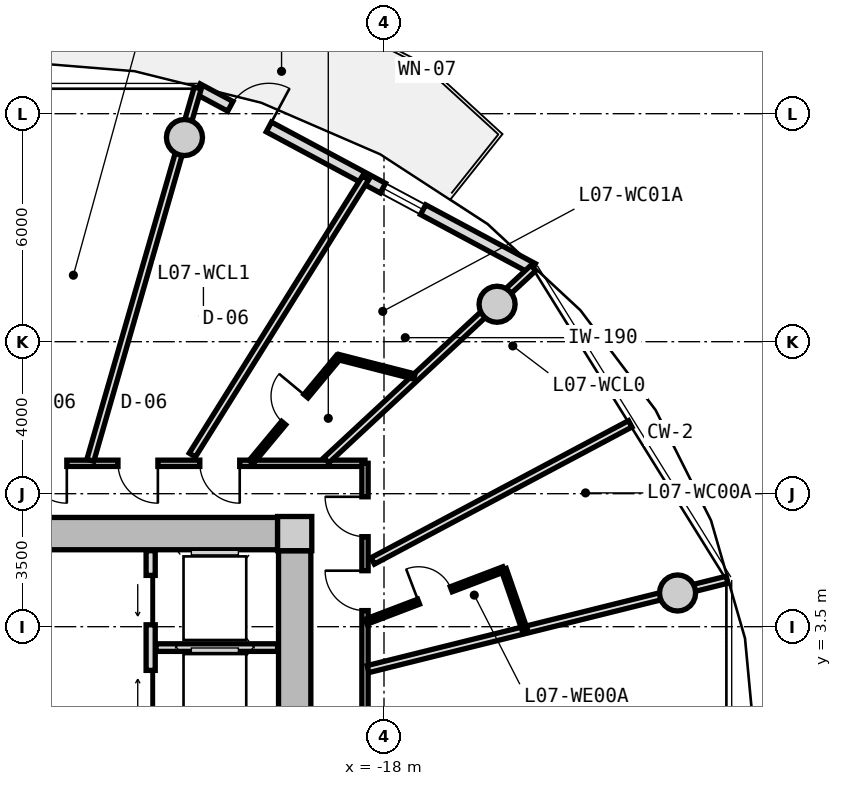
"""IFC4 building model, lengths in metres.
Left out: names, types, materials, properties, quantities, classifications, styles, units other than length and angle.
Written with IfcOpenShell. Run it as: python <this file> out.ifc"""

import sys

from ifc_helpers import new_model, si_unit, direction, frame, frame_2d, origin, origin_2d, place, context, subcontext, project, spatial, rectangle, circle, extrude, source, transform, mapped, element, fill, save


model = new_model("IFC4")
c1 = context("Model", 3, precision=1e-05, world=origin(), true_north=direction((0.0, 1.0)))
c2 = subcontext(c1, "Body", "Model", "MODEL_VIEW")
j1 = project(units=[si_unit("LENGTHUNIT", "METRE"), si_unit("PLANEANGLEUNIT", "RADIAN")], contexts=[c1])
p1 = place(None, origin())
s1 = spatial("IfcSite", under=j1, at=p1, CompositionType="ELEMENT")
p2 = place(p1, origin())
s2 = spatial("IfcBuilding", under=s1, at=p2, CompositionType="ELEMENT")
p3 = place(p2, frame((0.0, 0.0, 27.7)))
s3 = spatial("IfcBuildingStorey", under=s2, at=p3, CompositionType="ELEMENT", Elevation=27.7)
m1 = source(origin(), c2, "Body", "SweptSolid", [
    extrude(rectangle(XDim=0.9, YDim=0.9, at=origin_2d()), origin(), (0.0, 0.0, 1.0), 3.05),
])
p4 = place(p3, frame((-20.35, 5.95, 0.0), z_axis=(0.0, 0.0, 1.0), x_axis=(1.0, 0.0, 0.0)))
e1 = element("IfcColumn", 1, at=p4, inside=s3, PredefinedType="COLUMN", context=c2, shape_type="MappedRepresentation", body=[
    mapped(m1, transform((0.0, 0.0, 0.0), x_axis=(1.0, 0.0, 0.0), y_axis=(0.0, 1.0, 0.0), z_axis=(0.0, 0.0, 1.0), scale=1.0)),
])
m2 = source(origin(), c2, "Body", "SweptSolid", [
    extrude(rectangle(XDim=14.4, YDim=0.85, at=frame_2d((7.2, 0.0))), origin(), (0.0, 0.0, 1.0), 2.79),
])
p5 = place(p3, frame((-35.2, 5.95, 0.0), z_axis=(0.0, 0.0, 1.0), x_axis=(1.0, 0.0, 0.0)))
e2 = element("IfcWall", 2, at=p5, inside=s3, PredefinedType="SHEAR", context=c2, shape_type="MappedRepresentation", body=[
    mapped(m2, transform((0.0, 0.0, 0.0), x_axis=(1.0, 0.0, 0.0), y_axis=(0.0, 1.0, 0.0), z_axis=(0.0, 0.0, 1.0), scale=1.0)),
])
m3 = source(origin(), c2, "Body", "SweptSolid", [
    extrude(rectangle(XDim=11.0, YDim=0.85, at=frame_2d((5.5, 0.0))), origin(), (0.0, 0.0, 1.0), 2.79),
])
p6 = place(p3, frame((-20.35, 5.5, 0.0), z_axis=(0.0, 0.0, 1.0), x_axis=(0.0, -1.0, 0.0)))
e3 = element("IfcWall", 3, at=p6, inside=s3, PredefinedType="SHEAR", context=c2, shape_type="MappedRepresentation", body=[
    mapped(m3, transform((0.0, 0.0, 0.0), x_axis=(1.0, 0.0, 0.0), y_axis=(0.0, 1.0, 0.0), z_axis=(0.0, 0.0, 1.0), scale=1.0)),
])
p7 = place(p6, frame((5.65, 0.0, 0.0)))
e4 = element("IfcOpeningElement", 4, at=p7, cuts=e3, PredefinedType="OPENING", context=c2, shape_type="SweptSolid", body=[
    extrude(rectangle(XDim=1.2, YDim=2.15, at=frame_2d((0.6, 1.075))), frame((0.0, 0.435, 0.0), z_axis=(0.0, -1.0, 0.0), x_axis=(1.0, 0.0, 0.0)), (0.0, 0.0, 1.0), 0.87),
])
m4 = source(origin(), c2, "Body", "SweptSolid", [
    extrude(circle(Radius=0.475, at=origin_2d()), origin(), (0.0, 0.0, 1.0), 3.05),
])
for number, where, z_axis, x_axis in (
    (5, (-10.275, 4.387, 0.0), (0.0, 0.0, 1.0), (1.0, 0.0, 0.0)),
    (6, (-15.025, 11.985, 0.0), (0.0, 0.0, 1.0), (1.0, 0.0, 0.0)),
    (7, (-23.251, 16.373, 0.0), (0.0, 0.0, 1.0), (1.0, 0.0, 0.0)),
):
    element("IfcColumn", number, at=place(p3, frame(where, z_axis=z_axis, x_axis=x_axis)), inside=s3, PredefinedType="COLUMN", context=c2, shape_type="MappedRepresentation", body=[
        mapped(m4, transform((0.0, 0.0, 0.0), x_axis=(1.0, 0.0, 0.0), y_axis=(0.0, 1.0, 0.0), z_axis=(0.0, 0.0, 1.0), scale=1.0)),
    ])
m5 = source(origin(), c2, "Body", "SweptSolid", [
    extrude(rectangle(XDim=10.011, YDim=0.29, at=frame_2d((5.005, 0.0))), origin(), (0.0, 0.0, 1.0), 2.79),
])
p8 = place(p3, frame((-22.906, 17.657, 0.0), z_axis=(0.0, 0.0, 1.0), x_axis=(0.881272505317, -0.472608475773, 0.0)))
e8 = element("IfcWall", 8, at=p8, inside=s3, PredefinedType="SOLIDWALL", context=c2, shape_type="MappedRepresentation", body=[
    mapped(m5, transform((0.0, 0.0, 0.0), x_axis=(1.0, 0.0, 0.0), y_axis=(0.0, 1.0, 0.0), z_axis=(0.0, 0.0, 1.0), scale=1.0)),
])
p9 = place(p8, frame((0.98, 0.0, 0.0)))
e9 = element("IfcOpeningElement", 9, at=p9, cuts=e8, PredefinedType="OPENING", context=c2, shape_type="SweptSolid", body=[
    extrude(rectangle(XDim=1.15, YDim=2.25, at=frame_2d((0.575, 1.125))), frame((0.0, 0.155, 0.0), z_axis=(0.0, -1.0, 0.0), x_axis=(1.0, 0.0, 0.0)), (0.0, 0.0, 1.0), 0.31),
])
p10 = place(p8, frame((5.535, 0.0, 0.85)))
e10 = element("IfcOpeningElement", 10, at=p10, cuts=e8, PredefinedType="OPENING", context=c2, shape_type="SweptSolid", body=[
    extrude(rectangle(XDim=1.2, YDim=1.5, at=frame_2d((0.6, 0.75))), frame((0.0, 0.155, 0.0), z_axis=(0.0, -1.0, 0.0), x_axis=(1.0, 0.0, 0.0)), (0.0, 0.0, 1.0), 0.31),
])
m6 = source(origin(), c2, "Body", "SweptSolid", [
    extrude(rectangle(XDim=5.0, YDim=0.24, at=frame_2d((2.5, 0.0))), origin(), (0.0, 0.0, 1.0), 2.775),
])
p11 = place(p3, frame((-24.14, 0.5, 0.0), z_axis=(0.0, 0.0, 1.0), x_axis=(0.0, 1.0, 0.0)))
e11 = element("IfcWall", 11, at=p11, inside=s3, PredefinedType="PARTITIONING", context=c2, shape_type="MappedRepresentation", body=[
    mapped(m6, transform((0.0, 0.0, 0.0), x_axis=(1.0, 0.0, 0.0), y_axis=(0.0, 1.0, 0.0), z_axis=(0.0, 0.0, 1.0), scale=1.0)),
])
p12 = place(p11, frame((3.05, 0.0, 0.0)))
e12 = element("IfcOpeningElement", 12, at=p12, cuts=e11, PredefinedType="OPENING", context=c2, shape_type="SweptSolid", body=[
    extrude(rectangle(XDim=1.3, YDim=2.2, at=frame_2d((0.65, 1.1))), frame((0.0, 0.13, 0.0), z_axis=(0.0, -1.0, 0.0), x_axis=(1.0, 0.0, 0.0)), (0.0, 0.0, 1.0), 0.26),
])
p13 = place(p11, frame((0.55, 0.0, 0.0)))
e13 = element("IfcOpeningElement", 13, at=p13, cuts=e11, PredefinedType="OPENING", context=c2, shape_type="SweptSolid", body=[
    extrude(rectangle(XDim=1.3, YDim=2.2, at=frame_2d((0.65, 1.1))), frame((0.0, 0.13, 0.0), z_axis=(0.0, -1.0, 0.0), x_axis=(1.0, 0.0, 0.0)), (0.0, 0.0, 1.0), 0.26),
])
m7 = source(origin(), c2, "Body", "SweptSolid", [
    extrude(rectangle(XDim=3.2, YDim=0.2, at=frame_2d((1.6, 0.0))), origin(), (0.0, 0.0, 1.0), 2.775),
])
p14 = place(p3, frame((-24.0, 2.95, 0.0), z_axis=(0.0, 0.0, 1.0), x_axis=(1.0, 0.0, 0.0)))
e14 = element("IfcWall", 14, at=p14, inside=s3, PredefinedType="PARTITIONING", context=c2, shape_type="MappedRepresentation", body=[
    mapped(m7, transform((0.0, 0.0, 0.0), x_axis=(1.0, 0.0, 0.0), y_axis=(0.0, 1.0, 0.0), z_axis=(0.0, 0.0, 1.0), scale=1.0)),
])
m8 = source(origin(), c2, "Body", "SweptSolid", [
    extrude(rectangle(XDim=19.0, YDim=0.165, at=frame_2d((9.5, 0.0))), origin(), (0.0, 0.0, 1.0), 2.775),
])
p15 = place(p3, frame((-37.5, 7.8, 0.0), z_axis=(0.0, 0.0, 1.0), x_axis=(1.0, 0.0, 0.0)))
e15 = element("IfcWall", 15, at=p15, inside=s3, PredefinedType="PARTITIONING", context=c2, shape_type="MappedRepresentation", body=[
    mapped(m8, transform((0.0, 0.0, 0.0), x_axis=(1.0, 0.0, 0.0), y_axis=(0.0, 1.0, 0.0), z_axis=(0.0, 0.0, 1.0), scale=1.0)),
])
p16 = place(p15, frame((14.653, 0.0, 0.0)))
e16 = element("IfcOpeningElement", 16, at=p16, cuts=e15, PredefinedType="OPENING", context=c2, shape_type="SweptSolid", body=[
    extrude(rectangle(XDim=1.05, YDim=2.15, at=frame_2d((0.525, 1.075))), frame((0.0, 0.093, 0.0), z_axis=(0.0, -1.0, 0.0), x_axis=(1.0, 0.0, 0.0)), (0.0, 0.0, 1.0), 0.185),
])
p17 = place(p15, frame((12.5, 0.0, 0.0)))
e17 = element("IfcOpeningElement", 17, at=p17, cuts=e15, PredefinedType="OPENING", context=c2, shape_type="SweptSolid", body=[
    extrude(rectangle(XDim=1.05, YDim=2.15, at=frame_2d((0.525, 1.075))), frame((0.0, 0.093, 0.0), z_axis=(0.0, -1.0, 0.0), x_axis=(1.0, 0.0, 0.0)), (0.0, 0.0, 1.0), 0.185),
])
p18 = place(p15, frame((10.104, 0.0, 0.0)))
e18 = element("IfcOpeningElement", 18, at=p18, cuts=e15, PredefinedType="OPENING", context=c2, shape_type="SweptSolid", body=[
    extrude(rectangle(XDim=1.05, YDim=2.15, at=frame_2d((0.525, 1.075))), frame((0.0, 0.093, 0.0), z_axis=(0.0, -1.0, 0.0), x_axis=(1.0, 0.0, 0.0)), (0.0, 0.0, 1.0), 0.185),
])
p19 = place(p15, frame((7.806, 0.0, 0.0)))
e19 = element("IfcOpeningElement", 19, at=p19, cuts=e15, PredefinedType="OPENING", context=c2, shape_type="SweptSolid", body=[
    extrude(rectangle(XDim=1.05, YDim=2.15, at=frame_2d((0.525, 1.075))), frame((0.0, 0.093, 0.0), z_axis=(0.0, -1.0, 0.0), x_axis=(1.0, 0.0, 0.0)), (0.0, 0.0, 1.0), 0.185),
])
p20 = place(p15, frame((5.915, 0.0, 0.0)))
e20 = element("IfcOpeningElement", 20, at=p20, cuts=e15, PredefinedType="OPENING", context=c2, shape_type="SweptSolid", body=[
    extrude(rectangle(XDim=0.92, YDim=2.1, at=frame_2d((0.46, 1.05))), frame((0.0, 0.093, 0.0), z_axis=(0.0, -1.0, 0.0), x_axis=(1.0, 0.0, 0.0)), (0.0, 0.0, 1.0), 0.185),
])
p21 = place(p15, frame((2.769, 0.0, 0.0)))
e21 = element("IfcOpeningElement", 21, at=p21, cuts=e15, PredefinedType="OPENING", context=c2, shape_type="SweptSolid", body=[
    extrude(rectangle(XDim=0.92, YDim=2.1, at=frame_2d((0.46, 1.05))), frame((0.0, 0.093, 0.0), z_axis=(0.0, -1.0, 0.0), x_axis=(1.0, 0.0, 0.0)), (0.0, 0.0, 1.0), 0.185),
])
m9 = source(origin(), c2, "Body", "SweptSolid", [
    extrude(rectangle(XDim=15.6, YDim=0.165, at=frame_2d((7.8, 0.0))), origin(), (0.0, 0.0, 1.0), 2.775),
])
p22 = place(p3, frame((-18.5, 7.8, 0.0), z_axis=(0.0, 0.0, 1.0), x_axis=(0.0, -1.0, 0.0)))
e22 = element("IfcWall", 22, at=p22, inside=s3, PredefinedType="PARTITIONING", context=c2, shape_type="MappedRepresentation", body=[
    mapped(m9, transform((0.0, 0.0, 0.0), x_axis=(1.0, 0.0, 0.0), y_axis=(0.0, 1.0, 0.0), z_axis=(0.0, 0.0, 1.0), scale=1.0)),
])
p23 = place(p22, frame((12.141, 0.0, 0.0)))
e23 = element("IfcOpeningElement", 23, at=p23, cuts=e22, PredefinedType="OPENING", context=c2, shape_type="SweptSolid", body=[
    extrude(rectangle(XDim=1.25, YDim=2.2, at=frame_2d((0.625, 1.1))), frame((0.0, 0.093, 0.0), z_axis=(0.0, -1.0, 0.0), x_axis=(1.0, 0.0, 0.0)), (0.0, 0.0, 1.0), 0.185),
])
p24 = place(p22, frame((7.175, 0.0, 0.0)))
e24 = element("IfcOpeningElement", 24, at=p24, cuts=e22, PredefinedType="OPENING", context=c2, shape_type="SweptSolid", body=[
    extrude(rectangle(XDim=1.25, YDim=2.2, at=frame_2d((0.625, 1.1))), frame((0.0, 0.093, 0.0), z_axis=(0.0, -1.0, 0.0), x_axis=(1.0, 0.0, 0.0)), (0.0, 0.0, 1.0), 0.185),
])
p25 = place(p22, frame((2.826, 0.0, 0.0)))
e25 = element("IfcOpeningElement", 25, at=p25, cuts=e22, PredefinedType="OPENING", context=c2, shape_type="SweptSolid", body=[
    extrude(rectangle(XDim=1.05, YDim=2.15, at=frame_2d((0.525, 1.075))), frame((0.0, 0.093, 0.0), z_axis=(0.0, -1.0, 0.0), x_axis=(1.0, 0.0, 0.0)), (0.0, 0.0, 1.0), 0.185),
])
p26 = place(p22, frame((0.881, 0.0, 0.0)))
e26 = element("IfcOpeningElement", 26, at=p26, cuts=e22, PredefinedType="OPENING", context=c2, shape_type="SweptSolid", body=[
    extrude(rectangle(XDim=1.05, YDim=2.15, at=frame_2d((0.525, 1.075))), frame((0.0, 0.093, 0.0), z_axis=(0.0, -1.0, 0.0), x_axis=(1.0, 0.0, 0.0)), (0.0, 0.0, 1.0), 0.185),
])
m10 = source(origin(), c2, "Body", "SweptSolid", [
    extrude(rectangle(XDim=7.435, YDim=0.19, at=frame_2d((3.717, 0.0))), origin(), (0.0, 0.0, 1.0), 2.225),
])
p27 = place(p3, frame((-19.517, 7.88, 0.0), z_axis=(0.0, 0.0, 1.0), x_axis=(0.732651956848, 0.680603489652, 0.0)))
e27 = element("IfcWall", 27, at=p27, inside=s3, PredefinedType="PARTITIONING", context=c2, shape_type="MappedRepresentation", body=[
    mapped(m10, transform((0.0, 0.0, 0.0), x_axis=(1.0, 0.0, 0.0), y_axis=(0.0, 1.0, 0.0), z_axis=(0.0, 0.0, 1.0), scale=1.0)),
])
m11 = source(origin(), c2, "Body", "SweptSolid", [
    extrude(rectangle(XDim=10.196, YDim=0.19, at=frame_2d((5.098, 0.0))), origin(), (0.0, 0.0, 1.0), 2.225),
])
p28 = place(p3, frame((-25.727, 7.88, 0.0), z_axis=(0.0, 0.0, 1.0), x_axis=(0.277136420347, 0.960830580549, 0.0)))
e28 = element("IfcWall", 28, at=p28, inside=s3, PredefinedType="PARTITIONING", context=c2, shape_type="MappedRepresentation", body=[
    mapped(m11, transform((0.0, 0.0, 0.0), x_axis=(1.0, 0.0, 0.0), y_axis=(0.0, 1.0, 0.0), z_axis=(0.0, 0.0, 1.0), scale=1.0)),
])
m12 = source(origin(), c2, "Body", "SweptSolid", [
    extrude(rectangle(XDim=8.598, YDim=0.19, at=frame_2d((4.299, 0.0))), origin(), (0.0, 0.0, 1.0), 2.775),
])
p29 = place(p3, frame((-23.043, 8.017, 0.0), z_axis=(0.0, 0.0, 1.0), x_axis=(0.530039776395, 0.847972779893, 0.0)))
e29 = element("IfcWall", 29, at=p29, inside=s3, PredefinedType="PARTITIONING", context=c2, shape_type="MappedRepresentation", body=[
    mapped(m12, transform((0.0, 0.0, 0.0), x_axis=(1.0, 0.0, 0.0), y_axis=(0.0, 1.0, 0.0), z_axis=(0.0, 0.0, 1.0), scale=1.0)),
])
m13 = source(origin(), c2, "Body", "SweptSolid", [
    extrude(rectangle(XDim=3.594, YDim=0.14, at=frame_2d((1.797, 0.0))), origin(), (0.0, 0.0, 1.0), 2.775),
])
p30 = place(p3, frame((-21.496, 7.83, 0.0), z_axis=(0.0, 0.0, 1.0), x_axis=(0.639001147083, 0.769205781326, 0.0)))
e30 = element("IfcWall", 30, at=p30, inside=s3, PredefinedType="PARTITIONING", context=c2, shape_type="MappedRepresentation", body=[
    mapped(m13, transform((0.0, 0.0, 0.0), x_axis=(1.0, 0.0, 0.0), y_axis=(0.0, 1.0, 0.0), z_axis=(0.0, 0.0, 1.0), scale=1.0)),
])
p31 = place(p30, frame((1.337, 0.0, 0.0)))
e31 = element("IfcOpeningElement", 31, at=p31, cuts=e30, PredefinedType="OPENING", context=c2, shape_type="SweptSolid", body=[
    extrude(rectangle(XDim=0.92, YDim=2.1, at=frame_2d((0.46, 1.05))), frame((0.0, 0.08, 0.0), z_axis=(0.0, -1.0, 0.0), x_axis=(1.0, 0.0, 0.0)), (0.0, 0.0, 1.0), 0.16),
])
m14 = source(origin(), c2, "Body", "SweptSolid", [
    extrude(rectangle(XDim=2.062, YDim=0.14, at=frame_2d((1.031, 0.0))), origin(), (0.0, 0.0, 1.0), 2.415),
])
p32 = place(p3, frame((-19.199, 10.595, 0.0), z_axis=(0.0, 0.0, 1.0), x_axis=(0.968776253543, -0.247936626121, 0.0)))
e32 = element("IfcWall", 32, at=p32, inside=s3, PredefinedType="PARTITIONING", context=c2, shape_type="MappedRepresentation", body=[
    mapped(m14, transform((0.0, 0.0, 0.0), x_axis=(1.0, 0.0, 0.0), y_axis=(0.0, 1.0, 0.0), z_axis=(0.0, 0.0, 1.0), scale=1.0)),
])
m15 = source(origin(), c2, "Body", "SweptSolid", [
    extrude(rectangle(XDim=9.737, YDim=0.19, at=frame_2d((4.869, 0.0))), origin(), (0.0, 0.0, 1.0), 2.225),
])
p33 = place(p3, frame((-18.42, 2.385, 0.0), z_axis=(0.0, 0.0, 1.0), x_axis=(0.970392716238, 0.241532557375, 0.0)))
e33 = element("IfcWall", 33, at=p33, inside=s3, PredefinedType="PARTITIONING", context=c2, shape_type="MappedRepresentation", body=[
    mapped(m15, transform((0.0, 0.0, 0.0), x_axis=(1.0, 0.0, 0.0), y_axis=(0.0, 1.0, 0.0), z_axis=(0.0, 0.0, 1.0), scale=1.0)),
])
m16 = source(origin(), c2, "Body", "SweptSolid", [
    extrude(rectangle(XDim=7.677, YDim=0.19, at=frame_2d((3.838, 0.0))), origin(), (0.0, 0.0, 1.0), 2.775),
])
p34 = place(p3, frame((-18.297, 5.231, 0.0), z_axis=(0.0, 0.0, 1.0), x_axis=(0.882725057546, 0.469889851753, 0.0)))
e34 = element("IfcWall", 34, at=p34, inside=s3, PredefinedType="PARTITIONING", context=c2, shape_type="MappedRepresentation", body=[
    mapped(m16, transform((0.0, 0.0, 0.0), x_axis=(1.0, 0.0, 0.0), y_axis=(0.0, 1.0, 0.0), z_axis=(0.0, 0.0, 1.0), scale=1.0)),
])
m17 = source(origin(), c2, "Body", "SweptSolid", [
    extrude(rectangle(XDim=3.874, YDim=0.14, at=frame_2d((1.937, 0.0))), origin(), (0.0, 0.0, 1.0), 2.775),
])
p35 = place(p3, frame((-18.47, 3.632, 0.0), z_axis=(0.0, 0.0, 1.0), x_axis=(0.934461775659, 0.35606346321, 0.0)))
e35 = element("IfcWall", 35, at=p35, inside=s3, PredefinedType="PARTITIONING", context=c2, shape_type="MappedRepresentation", body=[
    mapped(m17, transform((0.0, 0.0, 0.0), x_axis=(1.0, 0.0, 0.0), y_axis=(0.0, 1.0, 0.0), z_axis=(0.0, 0.0, 1.0), scale=1.0)),
])
p36 = place(p35, frame((1.477, 0.0, 0.0)))
e36 = element("IfcOpeningElement", 36, at=p36, cuts=e35, PredefinedType="OPENING", context=c2, shape_type="SweptSolid", body=[
    extrude(rectangle(XDim=0.92, YDim=2.1, at=frame_2d((0.46, 1.05))), frame((0.0, 0.08, 0.0), z_axis=(0.0, -1.0, 0.0), x_axis=(1.0, 0.0, 0.0)), (0.0, 0.0, 1.0), 0.16),
])
m18 = source(origin(), c2, "Body", "SweptSolid", [
    extrude(rectangle(XDim=1.676, YDim=0.14, at=frame_2d((0.838, 0.0))), origin(), (0.0, 0.0, 1.0), 2.775),
])
p37 = place(p3, frame((-14.85, 5.011, 0.0), z_axis=(0.0, 0.0, 1.0), x_axis=(0.327785970556, -0.944752008469, 0.0)))
e37 = element("IfcWall", 37, at=p37, inside=s3, PredefinedType="PARTITIONING", context=c2, shape_type="MappedRepresentation", body=[
    mapped(m18, transform((0.0, 0.0, 0.0), x_axis=(1.0, 0.0, 0.0), y_axis=(0.0, 1.0, 0.0), z_axis=(0.0, 0.0, 1.0), scale=1.0)),
])
m19 = source(origin(), c2, "Body", "SweptSolid", [
    extrude(rectangle(XDim=1.15, YDim=2.25, at=frame_2d((0.575, 1.125))), frame((0.0, 0.025, 0.0), z_axis=(0.0, -1.0, 0.0), x_axis=(1.0, 0.0, 0.0)), (0.0, 0.0, 1.0), 0.05),
])
p38 = place(p9, origin())
e38 = element("IfcDoor", 38, at=p38, inside=s3, OperationType="SINGLE_SWING_RIGHT", PredefinedType="DOOR", context=c2, shape_type="MappedRepresentation", body=[
    mapped(m19, transform((0.0, 0.0, 0.0), x_axis=(1.0, 0.0, 0.0), y_axis=(0.0, 1.0, 0.0), z_axis=(0.0, 0.0, 1.0), scale=1.0)),
])
fill(e9, e38)
m20 = source(origin(), c2, "Body", "SweptSolid", [
    extrude(rectangle(XDim=1.2, YDim=1.5, at=frame_2d((0.6, 0.75))), frame((0.0, 0.03, 0.0), z_axis=(0.0, -1.0, 0.0), x_axis=(1.0, 0.0, 0.0)), (0.0, 0.0, 1.0), 0.06),
])
p39 = place(p10, origin())
e39 = element("IfcWindow", 39, at=p39, inside=s3, PartitioningType="SINGLE_PANEL", PredefinedType="WINDOW", context=c2, shape_type="MappedRepresentation", body=[
    mapped(m20, transform((0.0, 0.0, 0.0), x_axis=(1.0, 0.0, 0.0), y_axis=(0.0, 1.0, 0.0), z_axis=(0.0, 0.0, 1.0), scale=1.0)),
])
fill(e10, e39)
m21 = source(origin(), c2, "Body", "SweptSolid", [
    extrude(rectangle(XDim=1.3, YDim=2.2, at=frame_2d((0.65, 1.1))), frame((0.0, 0.025, 0.0), z_axis=(0.0, -1.0, 0.0), x_axis=(1.0, 0.0, 0.0)), (0.0, 0.0, 1.0), 0.05),
])
p40 = place(p12, origin())
e40 = element("IfcDoor", 40, at=p40, inside=s3, OperationType="SLIDING_TO_LEFT", PredefinedType="DOOR", context=c2, shape_type="MappedRepresentation", body=[
    mapped(m21, transform((0.0, 0.0, 0.0), x_axis=(1.0, 0.0, 0.0), y_axis=(0.0, 1.0, 0.0), z_axis=(0.0, 0.0, 1.0), scale=1.0)),
])
fill(e12, e40)
p41 = place(p13, origin())
e41 = element("IfcDoor", 41, at=p41, inside=s3, OperationType="SLIDING_TO_RIGHT", PredefinedType="DOOR", context=c2, shape_type="MappedRepresentation", body=[
    mapped(m21, transform((0.0, 0.0, 0.0), x_axis=(1.0, 0.0, 0.0), y_axis=(0.0, 1.0, 0.0), z_axis=(0.0, 0.0, 1.0), scale=1.0)),
])
fill(e13, e41)
m22 = source(origin(), c2, "Body", "SweptSolid", [
    extrude(rectangle(XDim=1.05, YDim=2.15, at=frame_2d((0.525, 1.075))), frame((0.0, 0.025, 0.0), z_axis=(0.0, -1.0, 0.0), x_axis=(1.0, 0.0, 0.0)), (0.0, 0.0, 1.0), 0.05),
])
p42 = place(p16, frame((1.05, 0.0, 0.0), z_axis=(0.0, 0.0, 1.0), x_axis=(-1.0, 0.0, 0.0)))
e42 = element("IfcDoor", 42, at=p42, inside=s3, OperationType="SINGLE_SWING_LEFT", PredefinedType="DOOR", context=c2, shape_type="MappedRepresentation", body=[
    mapped(m22, transform((0.0, 0.0, 0.0), x_axis=(1.0, 0.0, 0.0), y_axis=(0.0, 1.0, 0.0), z_axis=(0.0, 0.0, 1.0), scale=1.0)),
])
fill(e16, e42)
m23 = source(origin(), c2, "Body", "SweptSolid", [
    extrude(rectangle(XDim=0.92, YDim=2.1, at=frame_2d((0.46, 1.05))), frame((0.0, 0.025, 0.0), z_axis=(0.0, -1.0, 0.0), x_axis=(1.0, 0.0, 0.0)), (0.0, 0.0, 1.0), 0.05),
])
p43 = place(p31, origin())
e43 = element("IfcDoor", 43, at=p43, inside=s3, OperationType="SINGLE_SWING_RIGHT", PredefinedType="DOOR", context=c2, shape_type="MappedRepresentation", body=[
    mapped(m23, transform((0.0, 0.0, 0.0), x_axis=(1.0, 0.0, 0.0), y_axis=(0.0, 1.0, 0.0), z_axis=(0.0, 0.0, 1.0), scale=1.0)),
])
fill(e31, e43)
p44 = place(p17, frame((1.05, 0.0, 0.0), z_axis=(0.0, 0.0, 1.0), x_axis=(-1.0, 0.0, 0.0)))
e44 = element("IfcDoor", 44, at=p44, inside=s3, OperationType="SINGLE_SWING_LEFT", PredefinedType="DOOR", context=c2, shape_type="MappedRepresentation", body=[
    mapped(m22, transform((0.0, 0.0, 0.0), x_axis=(1.0, 0.0, 0.0), y_axis=(0.0, 1.0, 0.0), z_axis=(0.0, 0.0, 1.0), scale=1.0)),
])
fill(e17, e44)
p45 = place(p18, frame((1.05, 0.0, 0.0), z_axis=(0.0, 0.0, 1.0), x_axis=(-1.0, 0.0, 0.0)))
e45 = element("IfcDoor", 45, at=p45, inside=s3, OperationType="SINGLE_SWING_LEFT", PredefinedType="DOOR", context=c2, shape_type="MappedRepresentation", body=[
    mapped(m22, transform((0.0, 0.0, 0.0), x_axis=(1.0, 0.0, 0.0), y_axis=(0.0, 1.0, 0.0), z_axis=(0.0, 0.0, 1.0), scale=1.0)),
])
fill(e18, e45)
p46 = place(p25, frame((1.05, 0.0, 0.0), z_axis=(0.0, 0.0, 1.0), x_axis=(-1.0, 0.0, 0.0)))
e46 = element("IfcDoor", 46, at=p46, inside=s3, OperationType="SINGLE_SWING_RIGHT", PredefinedType="DOOR", context=c2, shape_type="MappedRepresentation", body=[
    mapped(m22, transform((0.0, 0.0, 0.0), x_axis=(1.0, 0.0, 0.0), y_axis=(0.0, 1.0, 0.0), z_axis=(0.0, 0.0, 1.0), scale=1.0)),
])
fill(e25, e46)
p47 = place(p36, origin())
e47 = element("IfcDoor", 47, at=p47, inside=s3, OperationType="SINGLE_SWING_LEFT", PredefinedType="DOOR", context=c2, shape_type="MappedRepresentation", body=[
    mapped(m23, transform((0.0, 0.0, 0.0), x_axis=(1.0, 0.0, 0.0), y_axis=(0.0, 1.0, 0.0), z_axis=(0.0, 0.0, 1.0), scale=1.0)),
])
fill(e36, e47)
p48 = place(p26, frame((1.05, 0.0, 0.0), z_axis=(0.0, 0.0, 1.0), x_axis=(-1.0, 0.0, 0.0)))
e48 = element("IfcDoor", 48, at=p48, inside=s3, OperationType="SINGLE_SWING_RIGHT", PredefinedType="DOOR", context=c2, shape_type="MappedRepresentation", body=[
    mapped(m22, transform((0.0, 0.0, 0.0), x_axis=(1.0, 0.0, 0.0), y_axis=(0.0, 1.0, 0.0), z_axis=(0.0, 0.0, 1.0), scale=1.0)),
])
fill(e26, e48)
save(model, sys.argv[1])
